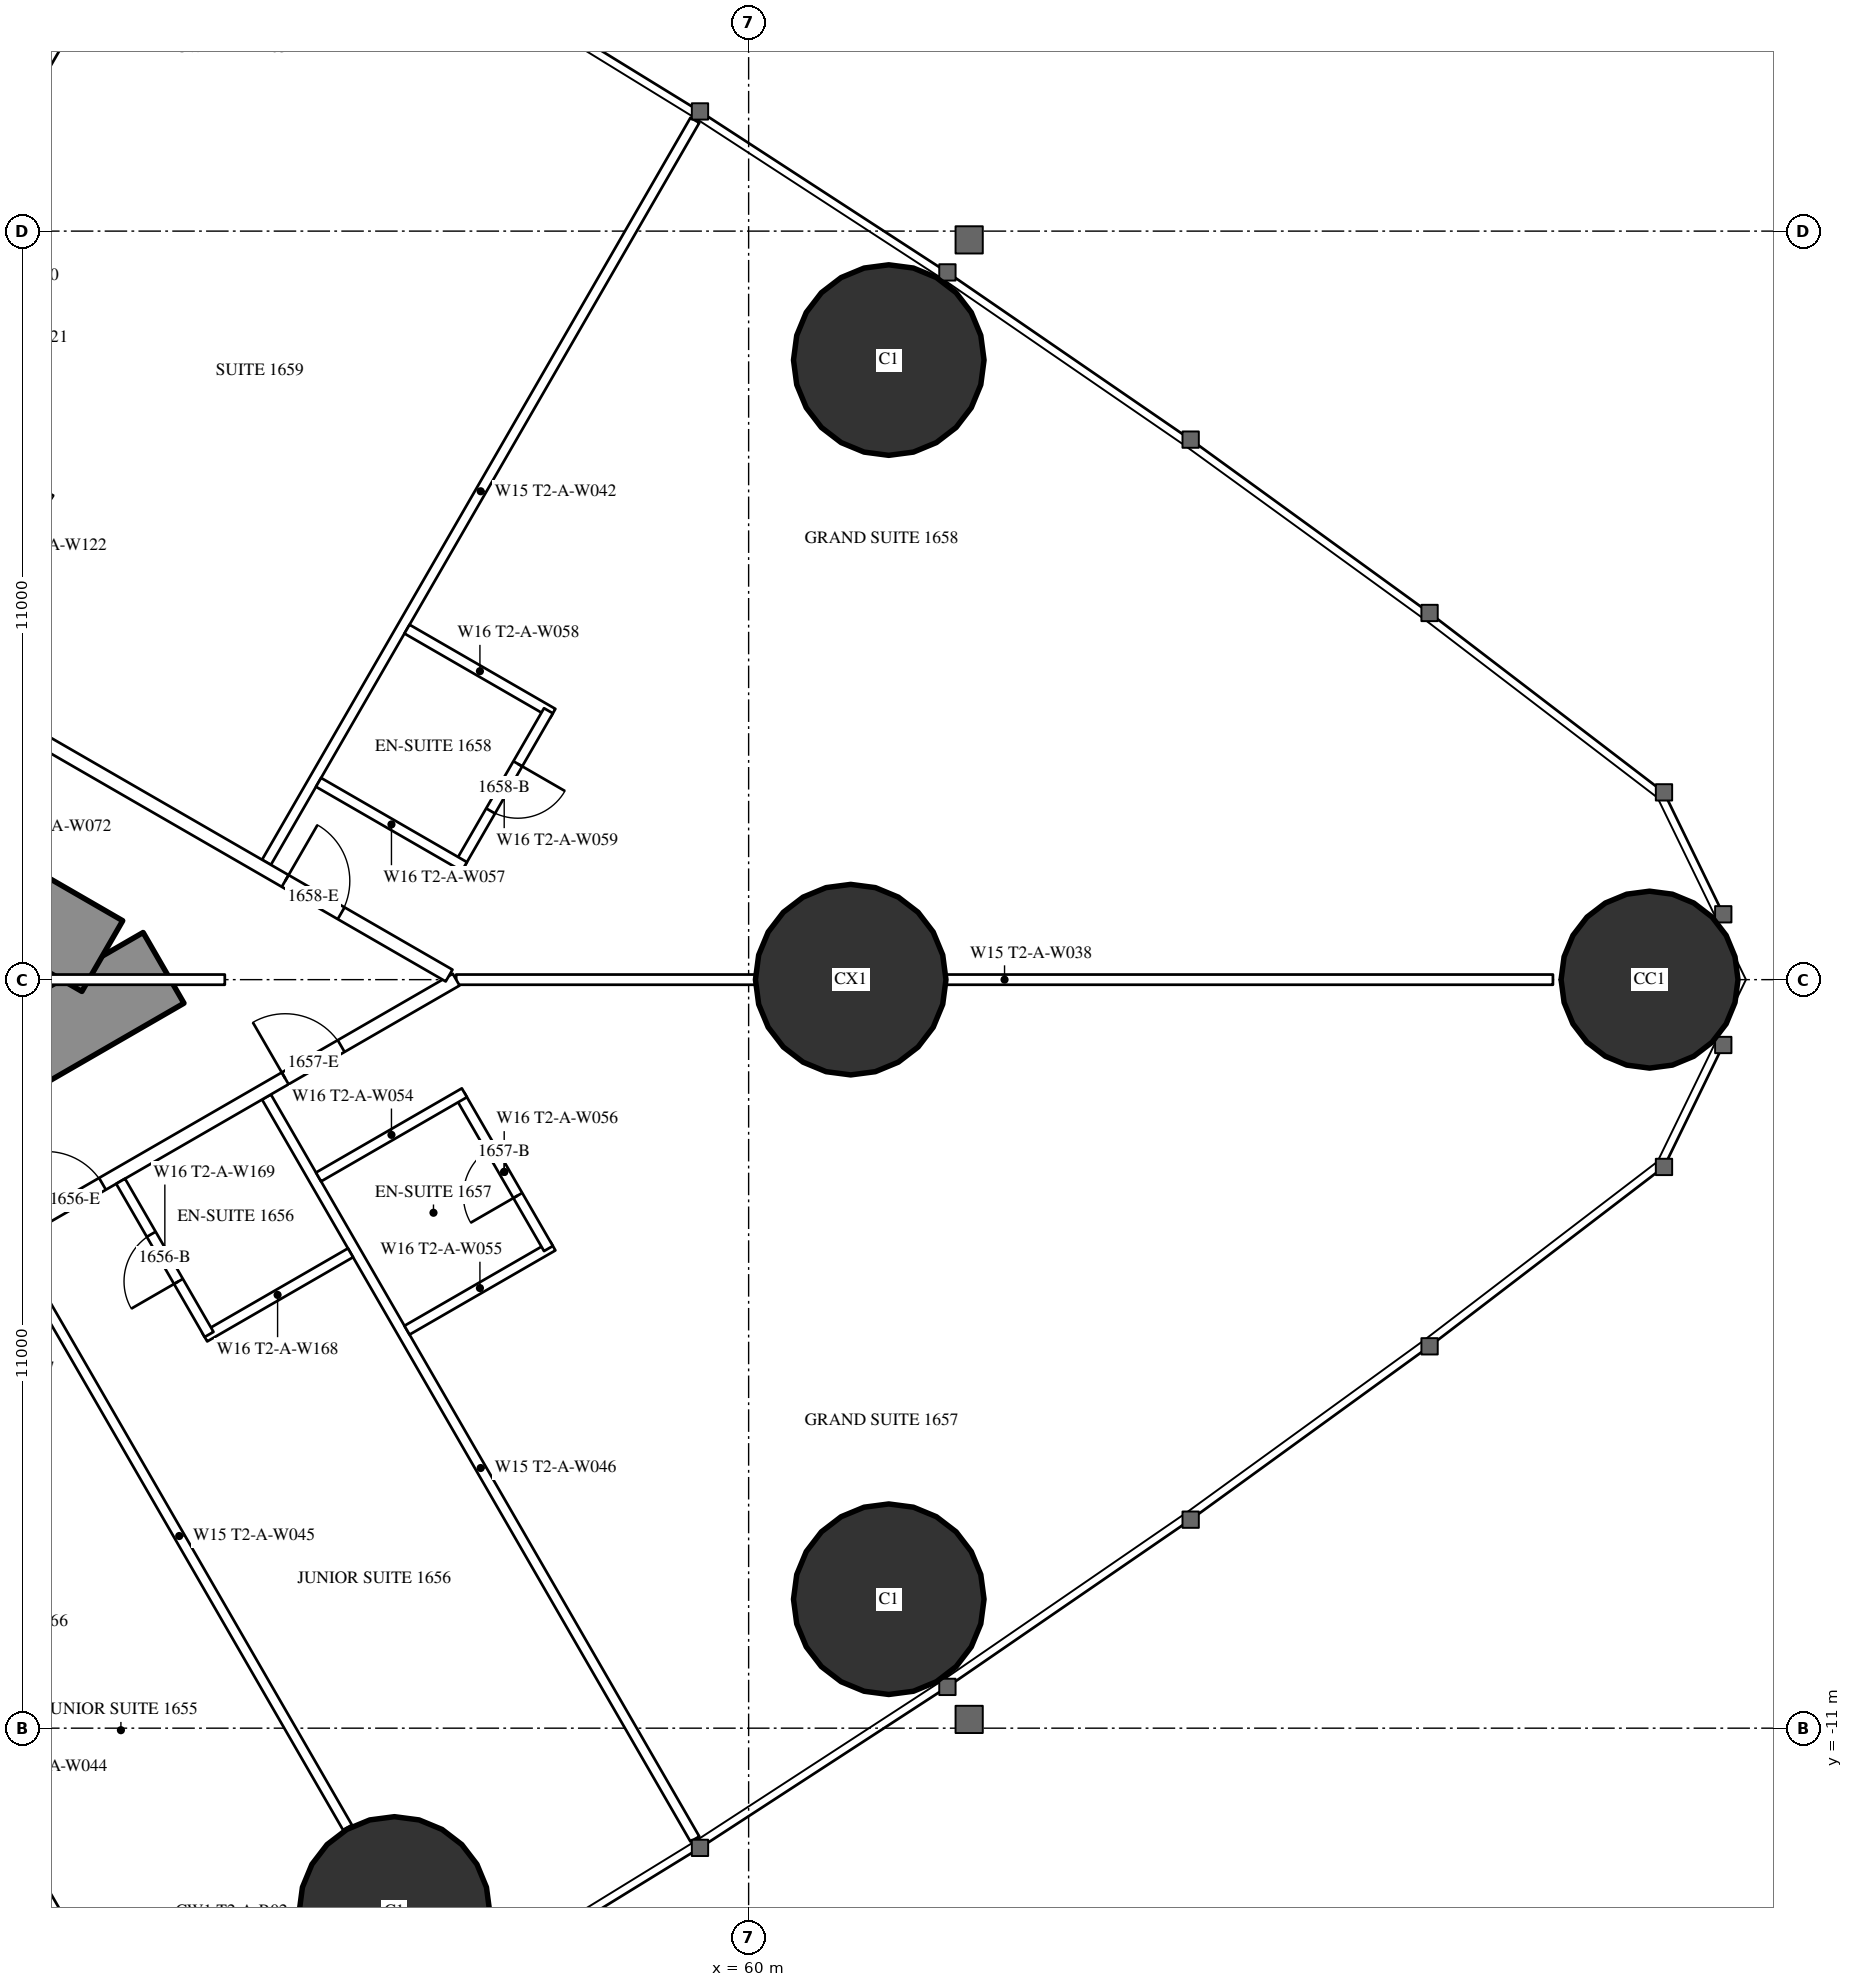
"""IFC4 building model, lengths in metres.
Left out: names, types, materials, properties, quantities, classifications, styles, units other than length and angle.
Written with IfcOpenShell. Run it as: python <this file> out.ifc"""

import sys

from ifc_helpers import new_model, si_unit, direction, frame, frame_2d, origin, origin_2d, place, context, subcontext, project, spatial, rectangle, hollow_circle, extrude, element, fill, save


model = new_model("IFC4")
c1 = context("Model", 3, precision=1e-05, world=origin(), true_north=direction((0.0, 1.0)))
c2 = subcontext(c1, "Body", "Model", "MODEL_VIEW")
j1 = project(units=[si_unit("LENGTHUNIT", "METRE"), si_unit("PLANEANGLEUNIT", "RADIAN")], contexts=[c1])
p1 = place(None, origin())
s1 = spatial("IfcSite", under=j1, at=p1, CompositionType="ELEMENT")
p2 = place(p1, origin())
s2 = spatial("IfcBuilding", under=s1, at=p2, CompositionType="ELEMENT")
p3 = place(p2, frame((0.0, 0.0, 63.5)))
s3 = spatial("IfcBuildingStorey", under=s2, at=p3, CompositionType="ELEMENT", Elevation=63.5)
p4 = place(p3, frame((73.239, 0.0, 0.0), z_axis=(0.0, 0.0, 1.0), x_axis=(1.0, 0.0, 0.0)))
e1 = element("IfcColumn", 1, at=p4, inside=s3, PredefinedType="COLUMN", context=c2, shape_type="SweptSolid", body=[
    extrude(hollow_circle(Radius=1.3, WallThickness=0.1, at=origin_2d()), origin(), (0.0, 0.0, 1.0), 3.5),
])
for number, where, z_axis, x_axis in (
    (2, (62.059, 9.105, 0.0), (0.0, 0.0, 1.0), (1.0, 0.0, 0.0)),
    (3, (54.795, -13.701, 0.0), (0.0, 0.0, 1.0), (1.0, 0.0, 0.0)),
    (4, (62.059, -9.105, 0.0), (0.0, 0.0, 1.0), (1.0, 0.0, 0.0)),
):
    element("IfcColumn", number, at=place(p3, frame(where, z_axis=z_axis, x_axis=x_axis)), inside=s3, PredefinedType="COLUMN", context=c2, shape_type="SweptSolid", body=[
        extrude(hollow_circle(Radius=1.4, WallThickness=0.12, at=origin_2d()), origin(), (0.0, 0.0, 1.0), 3.5),
    ])
p5 = place(p3, frame((61.5, 0.0, 0.0), z_axis=(0.0, 0.0, 1.0), x_axis=(1.0, 0.0, 0.0)))
e5 = element("IfcColumn", 5, at=p5, inside=s3, PredefinedType="COLUMN", context=c2, shape_type="SweptSolid", body=[
    extrude(hollow_circle(Radius=1.4, WallThickness=0.1, at=origin_2d()), origin(), (0.0, 0.0, 1.0), 3.5),
])
p6 = place(p3, frame((27.2, -13.8, 0.0), z_axis=(0.0, 0.0, 1.0), x_axis=(0.866027159892, 0.499996958321, 0.0)))
e6 = element("IfcWall", 6, at=p6, inside=s3, PredefinedType="SHEAR", context=c2, shape_type="SweptSolid", body=[
    extrude(rectangle(XDim=27.947, YDim=1.2, at=frame_2d((13.973, 0.0))), origin(), (0.0, 0.0, 1.0), 3.5),
])
p7 = place(p6, frame((4.6, 0.0, 0.0)))
e7 = element("IfcOpeningElement", 7, at=p7, cuts=e6, PredefinedType="OPENING", context=c2, shape_type="SweptSolid", body=[
    extrude(rectangle(XDim=1.0, YDim=2.2, at=frame_2d((0.5, 1.1))), frame((0.0, 0.61, 0.0), z_axis=(0.0, -1.0, 0.0), x_axis=(1.0, 0.0, 0.0)), (0.0, 0.0, 1.0), 1.22),
])
p8 = place(p6, frame((13.395, 0.0, 0.0)))
e8 = element("IfcOpeningElement", 8, at=p8, cuts=e6, PredefinedType="OPENING", context=c2, shape_type="SweptSolid", body=[
    extrude(rectangle(XDim=1.8, YDim=2.2, at=frame_2d((0.9, 1.1))), frame((0.0, 0.61, 0.0), z_axis=(0.0, -1.0, 0.0), x_axis=(1.0, 0.0, 0.0)), (0.0, 0.0, 1.0), 1.22),
])
p9 = place(p3, frame((27.2, 13.8, 0.0), z_axis=(0.0, 0.0, 1.0), x_axis=(0.866024515034, -0.500001539357, 0.0)))
e9 = element("IfcWall", 9, at=p9, inside=s3, PredefinedType="SHEAR", context=c2, shape_type="SweptSolid", body=[
    extrude(rectangle(XDim=26.907, YDim=1.2, at=frame_2d((13.454, 0.0))), origin(), (0.0, 0.0, 1.0), 3.5),
])
p10 = place(p9, frame((4.6, 0.0, 0.0)))
e10 = element("IfcOpeningElement", 10, at=p10, cuts=e9, PredefinedType="OPENING", context=c2, shape_type="SweptSolid", body=[
    extrude(rectangle(XDim=1.0, YDim=2.2, at=frame_2d((0.5, 1.1))), frame((0.0, 0.61, 0.0), z_axis=(0.0, -1.0, 0.0), x_axis=(1.0, 0.0, 0.0)), (0.0, 0.0, 1.0), 1.22),
])
p11 = place(p9, frame((13.395, 0.0, 0.0)))
e11 = element("IfcOpeningElement", 11, at=p11, cuts=e9, PredefinedType="OPENING", context=c2, shape_type="SweptSolid", body=[
    extrude(rectangle(XDim=1.8, YDim=2.2, at=frame_2d((0.9, 1.1))), frame((0.0, 0.61, 0.0), z_axis=(0.0, -1.0, 0.0), x_axis=(1.0, 0.0, 0.0)), (0.0, 0.0, 1.0), 1.22),
])
p12 = place(p3, frame((45.403, -6.062, 0.0), z_axis=(0.0, 0.0, 1.0), x_axis=(0.500007077968, -0.866021317279, 0.0)))
e12 = element("IfcWall", 12, at=p12, inside=s3, PredefinedType="PARTITIONING", context=c2, shape_type="SweptSolid", body=[
    extrude(rectangle(XDim=12.721, YDim=0.15, at=frame_2d((6.361, 0.0))), origin(), (0.0, 0.0, 1.0), 3.25),
])
p13 = place(p3, frame((49.159, -3.893, 0.0), z_axis=(0.0, 0.0, 1.0), x_axis=(0.499998773722, -0.866026111775, 0.0)))
e13 = element("IfcWall", 13, at=p13, inside=s3, PredefinedType="PARTITIONING", context=c2, shape_type="SweptSolid", body=[
    extrude(rectangle(XDim=9.892, YDim=0.15, at=frame_2d((4.946, 0.0))), origin(), (0.0, 0.0, 1.0), 2.25),
])
p14 = place(p3, frame((52.915, -1.725, 0.0), z_axis=(0.0, 0.0, 1.0), x_axis=(0.499997163113, -0.866027041656, 0.0)))
e14 = element("IfcWall", 14, at=p14, inside=s3, PredefinedType="PARTITIONING", context=c2, shape_type="SweptSolid", body=[
    extrude(rectangle(XDim=12.591, YDim=0.15, at=frame_2d((6.295, 0.0))), origin(), (0.0, 0.0, 1.0), 3.25),
])
p15 = place(p3, frame((45.403, 6.062, 0.0), z_axis=(0.0, 0.0, 1.0), x_axis=(0.500013434677, 0.866017647131, 0.0)))
e15 = element("IfcWall", 15, at=p15, inside=s3, PredefinedType="PARTITIONING", context=c2, shape_type="SweptSolid", body=[
    extrude(rectangle(XDim=9.902, YDim=0.15, at=frame_2d((4.951, 0.0))), origin(), (0.0, 0.0, 1.0), 2.25),
])
p16 = place(p3, frame((52.915, 1.725, 0.0), z_axis=(0.0, 0.0, 1.0), x_axis=(0.499997163113, 0.866027041656, 0.0)))
e16 = element("IfcWall", 16, at=p16, inside=s3, PredefinedType="PARTITIONING", context=c2, shape_type="SweptSolid", body=[
    extrude(rectangle(XDim=12.591, YDim=0.15, at=frame_2d((6.295, 0.0))), origin(), (0.0, 0.0, 1.0), 3.25),
])
p17 = place(p3, frame((55.702, 0.0, 0.0), z_axis=(0.0, 0.0, 1.0), x_axis=(1.0, 0.0, 0.0)))
e17 = element("IfcWall", 17, at=p17, inside=s3, PredefinedType="PARTITIONING", context=c2, shape_type="SweptSolid", body=[
    extrude(rectangle(XDim=16.117, YDim=0.15, at=frame_2d((8.059, 0.0))), origin(), (0.0, 0.0, 1.0), 2.25),
])
p18 = place(p3, frame((37.96, -10.243, 0.0), z_axis=(0.0, 0.0, 1.0), x_axis=(0.866026429433, 0.499998223521, 0.0)))
e18 = element("IfcWall", 18, at=p18, inside=s3, PredefinedType="PARTITIONING", context=c2, shape_type="SweptSolid", body=[
    extrude(rectangle(XDim=20.487, YDim=0.2, at=frame_2d((10.243, 0.0))), origin(), (0.0, 0.0, 1.0), 3.25),
])
p19 = place(p18, frame((6.925, 0.0, 0.0)))
e19 = element("IfcOpeningElement", 19, at=p19, cuts=e18, PredefinedType="OPENING", context=c2, shape_type="SweptSolid", body=[
    extrude(rectangle(XDim=0.95, YDim=2.2, at=frame_2d((0.475, 1.1))), frame((0.0, 0.11, 0.0), z_axis=(0.0, -1.0, 0.0), x_axis=(1.0, 0.0, 0.0)), (0.0, 0.0, 1.0), 0.22),
])
p20 = place(p18, frame((8.912, 0.0, 0.0)))
e20 = element("IfcOpeningElement", 20, at=p20, cuts=e18, PredefinedType="OPENING", context=c2, shape_type="SweptSolid", body=[
    extrude(rectangle(XDim=0.95, YDim=2.2, at=frame_2d((0.475, 1.1))), frame((0.0, 0.11, 0.0), z_axis=(0.0, -1.0, 0.0), x_axis=(1.0, 0.0, 0.0)), (0.0, 0.0, 1.0), 0.22),
])
p21 = place(p18, frame((13.535, 0.0, 0.0)))
e21 = element("IfcOpeningElement", 21, at=p21, cuts=e18, PredefinedType="OPENING", context=c2, shape_type="SweptSolid", body=[
    extrude(rectangle(XDim=0.95, YDim=2.2, at=frame_2d((0.475, 1.1))), frame((0.0, 0.11, 0.0), z_axis=(0.0, -1.0, 0.0), x_axis=(1.0, 0.0, 0.0)), (0.0, 0.0, 1.0), 0.22),
])
p22 = place(p18, frame((17.585, 0.0, 0.0)))
e22 = element("IfcOpeningElement", 22, at=p22, cuts=e18, PredefinedType="OPENING", context=c2, shape_type="SweptSolid", body=[
    extrude(rectangle(XDim=0.95, YDim=2.2, at=frame_2d((0.475, 1.1))), frame((0.0, 0.11, 0.0), z_axis=(0.0, -1.0, 0.0), x_axis=(1.0, 0.0, 0.0)), (0.0, 0.0, 1.0), 0.22),
])
p23 = place(p18, frame((2.875, 0.0, 0.0)))
e23 = element("IfcOpeningElement", 23, at=p23, cuts=e18, PredefinedType="OPENING", context=c2, shape_type="SweptSolid", body=[
    extrude(rectangle(XDim=0.95, YDim=2.2, at=frame_2d((0.475, 1.1))), frame((0.0, 0.11, 0.0), z_axis=(0.0, -1.0, 0.0), x_axis=(1.0, 0.0, 0.0)), (0.0, 0.0, 1.0), 0.22),
])
p24 = place(p3, frame((41.619, 8.131, 0.0), z_axis=(0.0, 0.0, 1.0), x_axis=(0.86603245327, -0.499987789734, 0.0)))
e24 = element("IfcWall", 24, at=p24, inside=s3, PredefinedType="PARTITIONING", context=c2, shape_type="SweptSolid", body=[
    extrude(rectangle(XDim=16.142, YDim=0.2, at=frame_2d((8.071, 0.0))), origin(), (0.0, 0.0, 1.0), 3.25),
])
p25 = place(p24, frame((13.36, 0.0, 0.0)))
e25 = element("IfcOpeningElement", 25, at=p25, cuts=e24, PredefinedType="OPENING", context=c2, shape_type="SweptSolid", body=[
    extrude(rectangle(XDim=0.95, YDim=2.2, at=frame_2d((0.475, 1.1))), frame((0.0, 0.11, 0.0), z_axis=(0.0, -1.0, 0.0), x_axis=(1.0, 0.0, 0.0)), (0.0, 0.0, 1.0), 0.22),
])
p26 = place(p24, frame((4.687, 0.0, 0.0)))
e26 = element("IfcOpeningElement", 26, at=p26, cuts=e24, PredefinedType="OPENING", context=c2, shape_type="SweptSolid", body=[
    extrude(rectangle(XDim=0.95, YDim=2.2, at=frame_2d((0.475, 1.1))), frame((0.0, 0.11, 0.0), z_axis=(0.0, -1.0, 0.0), x_axis=(1.0, 0.0, 0.0)), (0.0, 0.0, 1.0), 0.22),
])
p27 = place(p24, frame((2.987, 0.0, 0.0)))
e27 = element("IfcOpeningElement", 27, at=p27, cuts=e24, PredefinedType="OPENING", context=c2, shape_type="SweptSolid", body=[
    extrude(rectangle(XDim=0.95, YDim=2.2, at=frame_2d((0.475, 1.1))), frame((0.0, 0.11, 0.0), z_axis=(0.0, -1.0, 0.0), x_axis=(1.0, 0.0, 0.0)), (0.0, 0.0, 1.0), 0.22),
])
p28 = place(p3, frame((52.006, -5.251, 0.0), z_axis=(0.0, 0.0, 1.0), x_axis=(0.866006523861, 0.500032699561, 0.0)))
e28 = element("IfcWall", 28, at=p28, inside=s3, PredefinedType="PARTITIONING", context=c2, shape_type="SweptSolid", body=[
    extrude(rectangle(XDim=2.475, YDim=0.15, at=frame_2d((1.237, 0.0))), origin(), (0.0, 0.0, 1.0), 3.25),
])
p29 = place(p3, frame((50.771, -2.962, 0.0), z_axis=(0.0, 0.0, 1.0), x_axis=(0.500006934395, -0.866021400173, 0.0)))
e29 = element("IfcWall", 29, at=p29, inside=s3, PredefinedType="PARTITIONING", context=c2, shape_type="SweptSolid", body=[
    extrude(rectangle(XDim=2.6, YDim=0.15, at=frame_2d((1.3, 0.0))), origin(), (0.0, 0.0, 1.0), 3.25),
])
p30 = place(p29, frame((0.9, 0.0, 0.0)))
e30 = element("IfcOpeningElement", 30, at=p30, cuts=e29, PredefinedType="OPENING", context=c2, shape_type="SweptSolid", body=[
    extrude(rectangle(XDim=0.8, YDim=2.2, at=frame_2d((0.4, 1.1))), frame((0.0, 0.085, 0.0), z_axis=(0.0, -1.0, 0.0), x_axis=(1.0, 0.0, 0.0)), (0.0, 0.0, 1.0), 0.17),
])
p31 = place(p3, frame((54.98, -5.151, 0.0), z_axis=(0.0, 0.0, 1.0), x_axis=(0.86604923931, 0.499958713387, 0.0)))
e31 = element("IfcWall", 31, at=p31, inside=s3, PredefinedType="PARTITIONING", context=c2, shape_type="SweptSolid", body=[
    extrude(rectangle(XDim=2.475, YDim=0.15, at=frame_2d((1.237, 0.0))), origin(), (0.0, 0.0, 1.0), 3.25),
])
p32 = place(p3, frame((55.758, -1.7, 0.0), z_axis=(0.0, 0.0, 1.0), x_axis=(0.500006934395, -0.866021400173, 0.0)))
e32 = element("IfcWall", 32, at=p32, inside=s3, PredefinedType="PARTITIONING", context=c2, shape_type="SweptSolid", body=[
    extrude(rectangle(XDim=2.6, YDim=0.15, at=frame_2d((1.3, 0.0))), origin(), (0.0, 0.0, 1.0), 3.25),
])
p33 = place(p32, frame((0.9, 0.0, 0.0)))
e33 = element("IfcOpeningElement", 33, at=p33, cuts=e32, PredefinedType="OPENING", context=c2, shape_type="SweptSolid", body=[
    extrude(rectangle(XDim=0.8, YDim=2.2, at=frame_2d((0.4, 1.1))), frame((0.0, 0.085, 0.0), z_axis=(0.0, -1.0, 0.0), x_axis=(1.0, 0.0, 0.0)), (0.0, 0.0, 1.0), 0.17),
])
for number, where, z_axis, x_axis in (
    (34, (53.68, -2.9, 0.0), (0.0, 0.0, 1.0), (0.866, 0.5, 0.0)),
    (35, (54.98, 5.151, 0.0), (0.0, 0.0, 1.0), (0.866, -0.5, 0.0)),
):
    element("IfcWall", number, at=place(p3, frame(where, z_axis=z_axis, x_axis=x_axis)), inside=s3, PredefinedType="PARTITIONING", context=c2, shape_type="SweptSolid", body=[
        extrude(rectangle(XDim=2.475, YDim=0.15, at=frame_2d((1.237, 0.0))), origin(), (0.0, 0.0, 1.0), 3.25),
    ])
p34 = place(p3, frame((55.758, 1.7, 0.0), z_axis=(0.0, 0.0, 1.0), x_axis=(0.500006934395, 0.866021400173, 0.0)))
e36 = element("IfcWall", 36, at=p34, inside=s3, PredefinedType="PARTITIONING", context=c2, shape_type="SweptSolid", body=[
    extrude(rectangle(XDim=2.6, YDim=0.15, at=frame_2d((1.3, 0.0))), origin(), (0.0, 0.0, 1.0), 3.25),
])
p35 = place(p34, frame((0.9, 0.0, 0.0)))
e37 = element("IfcOpeningElement", 37, at=p35, cuts=e36, PredefinedType="OPENING", context=c2, shape_type="SweptSolid", body=[
    extrude(rectangle(XDim=0.8, YDim=2.2, at=frame_2d((0.4, 1.1))), frame((0.0, 0.085, 0.0), z_axis=(0.0, -1.0, 0.0), x_axis=(1.0, 0.0, 0.0)), (0.0, 0.0, 1.0), 0.17),
])
p36 = place(p3, frame((53.68, 2.9, 0.0), z_axis=(0.0, 0.0, 1.0), x_axis=(0.866006523861, -0.500032699561, 0.0)))
e38 = element("IfcWall", 38, at=p36, inside=s3, PredefinedType="PARTITIONING", context=c2, shape_type="SweptSolid", body=[
    extrude(rectangle(XDim=2.475, YDim=0.15, at=frame_2d((1.237, 0.0))), origin(), (0.0, 0.0, 1.0), 3.25),
])
p37 = place(p3, frame((44.575, 0.0, 0.0), z_axis=(0.0, 0.0, 1.0), x_axis=(1.0, 0.0, 0.0)))
e39 = element("IfcWall", 39, at=p37, inside=s3, PredefinedType="PARTITIONING", context=c2, shape_type="SweptSolid", body=[
    extrude(rectangle(XDim=7.727, YDim=0.15, at=frame_2d((3.864, 0.0))), origin(), (0.0, 0.0, 1.0), 2.25),
])
p38 = place(p30, origin())
e40 = element("IfcDoor", 40, at=p38, inside=s3, OperationType="SINGLE_SWING_RIGHT", PredefinedType="DOOR", context=c2, shape_type="SweptSolid", body=[
    extrude(rectangle(XDim=0.8, YDim=2.2, at=frame_2d((0.4, 1.1))), frame((0.0, 0.025, 0.0), z_axis=(0.0, -1.0, 0.0), x_axis=(1.0, 0.0, 0.0)), (0.0, 0.0, 1.0), 0.05),
])
fill(e30, e40)
p39 = place(p21, origin())
e41 = element("IfcDoor", 41, at=p39, inside=s3, OperationType="SINGLE_SWING_LEFT", PredefinedType="DOOR", context=c2, shape_type="SweptSolid", body=[
    extrude(rectangle(XDim=0.95, YDim=2.2, at=frame_2d((0.475, 1.1))), frame((0.0, 0.025, 0.0), z_axis=(0.0, -1.0, 0.0), x_axis=(1.0, 0.0, 0.0)), (0.0, 0.0, 1.0), 0.05),
])
fill(e21, e41)
p40 = place(p33, origin())
e42 = element("IfcDoor", 42, at=p40, inside=s3, OperationType="SINGLE_SWING_RIGHT", PredefinedType="DOOR", context=c2, shape_type="SweptSolid", body=[
    extrude(rectangle(XDim=0.8, YDim=2.2, at=frame_2d((0.4, 1.1))), frame((0.0, 0.025, 0.0), z_axis=(0.0, -1.0, 0.0), x_axis=(1.0, 0.0, 0.0)), (0.0, 0.0, 1.0), 0.05),
])
fill(e33, e42)
p41 = place(p22, origin())
e43 = element("IfcDoor", 43, at=p41, inside=s3, OperationType="SINGLE_SWING_LEFT", PredefinedType="DOOR", context=c2, shape_type="SweptSolid", body=[
    extrude(rectangle(XDim=0.95, YDim=2.2, at=frame_2d((0.475, 1.1))), frame((0.0, 0.025, 0.0), z_axis=(0.0, -1.0, 0.0), x_axis=(1.0, 0.0, 0.0)), (0.0, 0.0, 1.0), 0.05),
])
fill(e22, e43)
p42 = place(p35, origin())
e44 = element("IfcDoor", 44, at=p42, inside=s3, OperationType="SINGLE_SWING_RIGHT", PredefinedType="DOOR", context=c2, shape_type="SweptSolid", body=[
    extrude(rectangle(XDim=0.8, YDim=2.2, at=frame_2d((0.4, 1.1))), frame((0.0, 0.025, 0.0), z_axis=(0.0, -1.0, 0.0), x_axis=(1.0, 0.0, 0.0)), (0.0, 0.0, 1.0), 0.05),
])
fill(e37, e44)
p43 = place(p25, origin())
e45 = element("IfcDoor", 45, at=p43, inside=s3, OperationType="SINGLE_SWING_LEFT", PredefinedType="DOOR", context=c2, shape_type="SweptSolid", body=[
    extrude(rectangle(XDim=0.95, YDim=2.2, at=frame_2d((0.475, 1.1))), frame((0.0, 0.025, 0.0), z_axis=(0.0, -1.0, 0.0), x_axis=(1.0, 0.0, 0.0)), (0.0, 0.0, 1.0), 0.05),
])
fill(e25, e45)
save(model, sys.argv[1])
